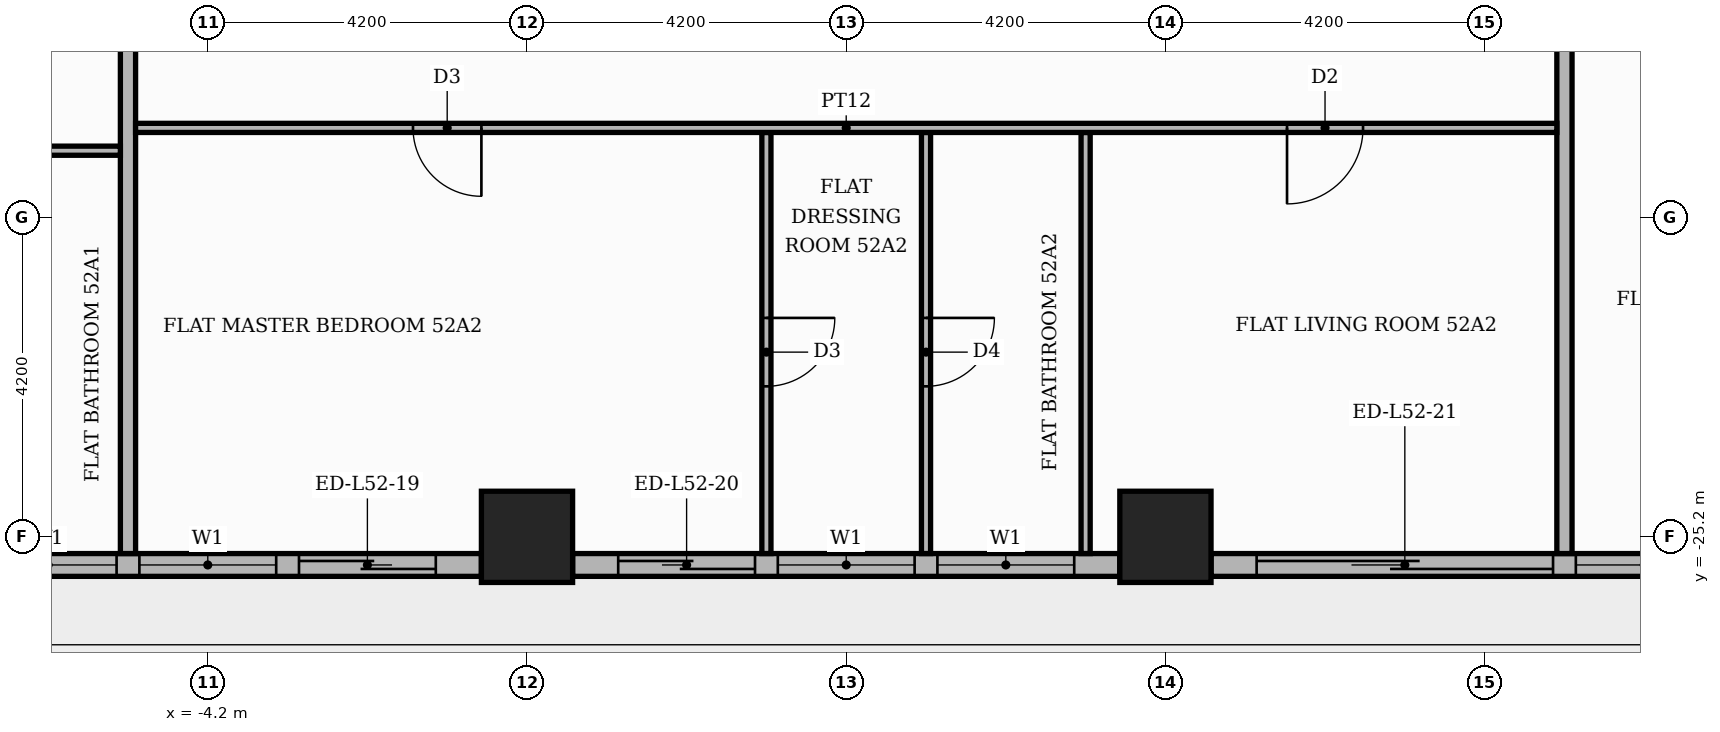
"""IFC4 building model, lengths in metres.
Left out: names, types, materials, properties, quantities, classifications, styles, units other than length and angle.
Written with IfcOpenShell. Run it as: python <this file> out.ifc"""

import sys

from ifc_helpers import new_model, si_unit, direction, frame, frame_2d, origin, origin_2d, place, context, subcontext, project, spatial, rectangle, extrude, element, fill, save


model = new_model("IFC4")
c1 = context("Model", 3, precision=1e-05, world=origin(), true_north=direction((0.0, 1.0)))
c2 = subcontext(c1, "Body", "Model", "MODEL_VIEW")
j1 = project(units=[si_unit("LENGTHUNIT", "METRE"), si_unit("PLANEANGLEUNIT", "RADIAN")], contexts=[c1])
p1 = place(None, origin())
s1 = spatial("IfcSite", under=j1, at=p1, CompositionType="ELEMENT")
p2 = place(p1, origin())
s2 = spatial("IfcBuilding", under=s1, at=p2, CompositionType="ELEMENT")
p3 = place(p2, frame((0.0, 0.0, 219.6)))
s3 = spatial("IfcBuildingStorey", under=s2, at=p3, CompositionType="ELEMENT", Elevation=219.6)
for number, where, z_axis, x_axis in (
    (1, (0.0, -25.2, 0.0), (0.0, 0.0, 1.0), (1.0, 0.0, 0.0)),
    (2, (8.4, -25.2, 0.0), (0.0, 0.0, 1.0), (1.0, 0.0, 0.0)),
):
    element("IfcColumn", number, at=place(p3, frame(where, z_axis=z_axis, x_axis=x_axis)), inside=s3, PredefinedType="COLUMN", context=c2, shape_type="SweptSolid", body=[
        extrude(rectangle(XDim=1.2, YDim=1.2, at=origin_2d()), origin(), (0.0, 0.0, 1.0), 3.9),
    ])
p4 = place(p3, frame((-7.8, -25.57, 0.0), z_axis=(0.0, 0.0, 1.0), x_axis=(1.0, 0.0, 0.0)))
e3 = element("IfcWall", 3, at=p4, inside=s3, PredefinedType="STANDARD", context=c2, shape_type="SweptSolid", body=[
    extrude(rectangle(XDim=7.2, YDim=0.3, at=frame_2d((3.6, 0.0))), origin(), (0.0, 0.0, 1.0), 3.48),
])
p5 = place(p4, frame((0.6, 0.0, 0.9)))
e4 = element("IfcOpeningElement", 4, at=p5, cuts=e3, PredefinedType="OPENING", context=c2, shape_type="SweptSolid", body=[
    extrude(rectangle(XDim=1.8, YDim=2.1, at=frame_2d((0.9, 1.05))), frame((0.0, 0.16, 0.0), z_axis=(0.0, -1.0, 0.0), x_axis=(1.0, 0.0, 0.0)), (0.0, 0.0, 1.0), 0.32),
])
p6 = place(p4, frame((2.7, 0.0, 0.9)))
e5 = element("IfcOpeningElement", 5, at=p6, cuts=e3, PredefinedType="OPENING", context=c2, shape_type="SweptSolid", body=[
    extrude(rectangle(XDim=1.8, YDim=2.1, at=frame_2d((0.9, 1.05))), frame((0.0, 0.16, 0.0), z_axis=(0.0, -1.0, 0.0), x_axis=(1.0, 0.0, 0.0)), (0.0, 0.0, 1.0), 0.32),
])
p7 = place(p4, frame((4.8, 0.0, 0.0)))
e6 = element("IfcOpeningElement", 6, at=p7, cuts=e3, PredefinedType="OPENING", context=c2, shape_type="SweptSolid", body=[
    extrude(rectangle(XDim=1.8, YDim=2.4, at=frame_2d((0.9, 1.2))), frame((0.0, 0.16, 0.0), z_axis=(0.0, -1.0, 0.0), x_axis=(1.0, 0.0, 0.0)), (0.0, 0.0, 1.0), 0.32),
])
p8 = place(p3, frame((0.6, -25.57, 0.0), z_axis=(0.0, 0.0, 1.0), x_axis=(1.0, 0.0, 0.0)))
e7 = element("IfcWall", 7, at=p8, inside=s3, PredefinedType="STANDARD", context=c2, shape_type="SweptSolid", body=[
    extrude(rectangle(XDim=7.2, YDim=0.3, at=frame_2d((3.6, 0.0))), origin(), (0.0, 0.0, 1.0), 3.48),
])
p9 = place(p8, frame((0.6, 0.0, 0.0)))
e8 = element("IfcOpeningElement", 8, at=p9, cuts=e7, PredefinedType="OPENING", context=c2, shape_type="SweptSolid", body=[
    extrude(rectangle(XDim=1.8, YDim=2.4, at=frame_2d((0.9, 1.2))), frame((0.0, 0.16, 0.0), z_axis=(0.0, -1.0, 0.0), x_axis=(1.0, 0.0, 0.0)), (0.0, 0.0, 1.0), 0.32),
])
p10 = place(p8, frame((2.7, 0.0, 0.9)))
e9 = element("IfcOpeningElement", 9, at=p10, cuts=e7, PredefinedType="OPENING", context=c2, shape_type="SweptSolid", body=[
    extrude(rectangle(XDim=1.8, YDim=2.1, at=frame_2d((0.9, 1.05))), frame((0.0, 0.16, 0.0), z_axis=(0.0, -1.0, 0.0), x_axis=(1.0, 0.0, 0.0)), (0.0, 0.0, 1.0), 0.32),
])
p11 = place(p8, frame((4.8, 0.0, 0.9)))
e10 = element("IfcOpeningElement", 10, at=p11, cuts=e7, PredefinedType="OPENING", context=c2, shape_type="SweptSolid", body=[
    extrude(rectangle(XDim=1.8, YDim=2.1, at=frame_2d((0.9, 1.05))), frame((0.0, 0.16, 0.0), z_axis=(0.0, -1.0, 0.0), x_axis=(1.0, 0.0, 0.0)), (0.0, 0.0, 1.0), 0.32),
])
p12 = place(p3, frame((9.0, -25.57, 0.0), z_axis=(0.0, 0.0, 1.0), x_axis=(1.0, 0.0, 0.0)))
e11 = element("IfcWall", 11, at=p12, inside=s3, PredefinedType="STANDARD", context=c2, shape_type="SweptSolid", body=[
    extrude(rectangle(XDim=7.2, YDim=0.3, at=frame_2d((3.6, 0.0))), origin(), (0.0, 0.0, 1.0), 3.48),
])
p13 = place(p12, frame((0.6, 0.0, 0.0)))
e12 = element("IfcOpeningElement", 12, at=p13, cuts=e11, PredefinedType="OPENING", context=c2, shape_type="SweptSolid", body=[
    extrude(rectangle(XDim=3.9, YDim=2.4, at=frame_2d((1.95, 1.2))), frame((0.0, 0.16, 0.0), z_axis=(0.0, -1.0, 0.0), x_axis=(1.0, 0.0, 0.0)), (0.0, 0.0, 1.0), 0.32),
])
p14 = place(p12, frame((4.8, 0.0, 0.9)))
e13 = element("IfcOpeningElement", 13, at=p14, cuts=e11, PredefinedType="OPENING", context=c2, shape_type="SweptSolid", body=[
    extrude(rectangle(XDim=1.8, YDim=2.1, at=frame_2d((0.9, 1.05))), frame((0.0, 0.16, 0.0), z_axis=(0.0, -1.0, 0.0), x_axis=(1.0, 0.0, 0.0)), (0.0, 0.0, 1.0), 0.32),
])
p15 = place(p3, frame((-5.25, -25.42, 0.0), z_axis=(0.0, 0.0, 1.0), x_axis=(0.0, 1.0, 0.0)))
e14 = element("IfcWall", 14, at=p15, inside=s3, PredefinedType="PARTITIONING", context=c2, shape_type="SweptSolid", body=[
    extrude(rectangle(XDim=11.67, YDim=0.2, at=frame_2d((5.835, 0.0))), origin(), (0.0, 0.0, 1.0), 3.48),
])
p16 = place(p3, frame((3.15, -25.42, 0.0), z_axis=(0.0, 0.0, 1.0), x_axis=(0.0, 1.0, 0.0)))
e15 = element("IfcWall", 15, at=p16, inside=s3, PredefinedType="PARTITIONING", context=c2, shape_type="SweptSolid", body=[
    extrude(rectangle(XDim=5.54, YDim=0.12, at=frame_2d((2.77, 0.0))), origin(), (0.0, 0.0, 1.0), 3.48),
])
p17 = place(p16, frame((2.2, 0.0, 0.0)))
e16 = element("IfcOpeningElement", 16, at=p17, cuts=e15, PredefinedType="OPENING", context=c2, shape_type="SweptSolid", body=[
    extrude(rectangle(XDim=0.9, YDim=2.1, at=frame_2d((0.45, 1.05))), frame((0.0, 0.07, 0.0), z_axis=(0.0, -1.0, 0.0), x_axis=(1.0, 0.0, 0.0)), (0.0, 0.0, 1.0), 0.14),
])
p18 = place(p3, frame((5.25, -25.42, 0.0), z_axis=(0.0, 0.0, 1.0), x_axis=(0.0, 1.0, 0.0)))
e17 = element("IfcWall", 17, at=p18, inside=s3, PredefinedType="PARTITIONING", context=c2, shape_type="SweptSolid", body=[
    extrude(rectangle(XDim=5.54, YDim=0.12, at=frame_2d((2.77, 0.0))), origin(), (0.0, 0.0, 1.0), 3.48),
])
p19 = place(p18, frame((2.2, 0.0, 0.0)))
e18 = element("IfcOpeningElement", 18, at=p19, cuts=e17, PredefinedType="OPENING", context=c2, shape_type="SweptSolid", body=[
    extrude(rectangle(XDim=0.9, YDim=2.1, at=frame_2d((0.45, 1.05))), frame((0.0, 0.07, 0.0), z_axis=(0.0, -1.0, 0.0), x_axis=(1.0, 0.0, 0.0)), (0.0, 0.0, 1.0), 0.14),
])
p20 = place(p3, frame((7.35, -25.42, 0.0), z_axis=(0.0, 0.0, 1.0), x_axis=(0.0, 1.0, 0.0)))
e19 = element("IfcWall", 19, at=p20, inside=s3, PredefinedType="PARTITIONING", context=c2, shape_type="SweptSolid", body=[
    extrude(rectangle(XDim=5.54, YDim=0.12, at=frame_2d((2.77, 0.0))), origin(), (0.0, 0.0, 1.0), 3.48),
])
p21 = place(p3, frame((13.65, -25.42, 0.0), z_axis=(0.0, 0.0, 1.0), x_axis=(0.0, 1.0, 0.0)))
e20 = element("IfcWall", 20, at=p21, inside=s3, PredefinedType="PARTITIONING", context=c2, shape_type="SweptSolid", body=[
    extrude(rectangle(XDim=11.67, YDim=0.2, at=frame_2d((5.835, 0.0))), origin(), (0.0, 0.0, 1.0), 3.48),
])
p22 = place(p3, frame((-25.42, -20.12, 0.0), z_axis=(0.0, 0.0, 1.0), x_axis=(1.0, 0.0, 0.0)))
e21 = element("IfcWall", 21, at=p22, inside=s3, PredefinedType="PARTITIONING", context=c2, shape_type="SweptSolid", body=[
    extrude(rectangle(XDim=20.07, YDim=0.12, at=frame_2d((10.035, 0.0))), origin(), (0.0, 0.0, 1.0), 3.48),
])
p23 = place(p22, frame((10.22, 0.0, 0.0)))
e22 = element("IfcOpeningElement", 22, at=p23, cuts=e21, PredefinedType="OPENING", context=c2, shape_type="SweptSolid", body=[
    extrude(rectangle(XDim=1.0, YDim=2.1, at=frame_2d((0.5, 1.05))), frame((0.0, 0.07, 0.0), z_axis=(0.0, -1.0, 0.0), x_axis=(1.0, 0.0, 0.0)), (0.0, 0.0, 1.0), 0.14),
])
p24 = place(p22, frame((13.42, 0.0, 0.0)))
e23 = element("IfcOpeningElement", 23, at=p24, cuts=e21, PredefinedType="OPENING", context=c2, shape_type="SweptSolid", body=[
    extrude(rectangle(XDim=0.9, YDim=2.1, at=frame_2d((0.45, 1.05))), frame((0.0, 0.07, 0.0), z_axis=(0.0, -1.0, 0.0), x_axis=(1.0, 0.0, 0.0)), (0.0, 0.0, 1.0), 0.14),
])
p25 = place(p3, frame((-5.15, -19.82, 0.0), z_axis=(0.0, 0.0, 1.0), x_axis=(1.0, 0.0, 0.0)))
e24 = element("IfcWall", 24, at=p25, inside=s3, PredefinedType="PARTITIONING", context=c2, shape_type="SweptSolid", body=[
    extrude(rectangle(XDim=18.7, YDim=0.12, at=frame_2d((9.35, 0.0))), origin(), (0.0, 0.0, 1.0), 3.48),
])
p26 = place(p25, frame((3.65, 0.0, 0.0)))
e25 = element("IfcOpeningElement", 25, at=p26, cuts=e24, PredefinedType="OPENING", context=c2, shape_type="SweptSolid", body=[
    extrude(rectangle(XDim=0.9, YDim=2.1, at=frame_2d((0.45, 1.05))), frame((0.0, 0.07, 0.0), z_axis=(0.0, -1.0, 0.0), x_axis=(1.0, 0.0, 0.0)), (0.0, 0.0, 1.0), 0.14),
])
p27 = place(p25, frame((15.15, 0.0, 0.0)))
e26 = element("IfcOpeningElement", 26, at=p27, cuts=e24, PredefinedType="OPENING", context=c2, shape_type="SweptSolid", body=[
    extrude(rectangle(XDim=1.0, YDim=2.1, at=frame_2d((0.5, 1.05))), frame((0.0, 0.07, 0.0), z_axis=(0.0, -1.0, 0.0), x_axis=(1.0, 0.0, 0.0)), (0.0, 0.0, 1.0), 0.14),
])
p28 = place(p5, origin())
e27 = element("IfcWindow", 27, at=p28, inside=s3, PartitioningType="SINGLE_PANEL", PredefinedType="WINDOW", context=c2, shape_type="SweptSolid", body=[
    extrude(rectangle(XDim=1.8, YDim=2.1, at=frame_2d((0.9, 1.05))), frame((0.0, 0.03, 0.0), z_axis=(0.0, -1.0, 0.0), x_axis=(1.0, 0.0, 0.0)), (0.0, 0.0, 1.0), 0.06),
])
fill(e4, e27)
p29 = place(p6, origin())
e28 = element("IfcWindow", 28, at=p29, inside=s3, PartitioningType="SINGLE_PANEL", PredefinedType="WINDOW", context=c2, shape_type="SweptSolid", body=[
    extrude(rectangle(XDim=1.8, YDim=2.1, at=frame_2d((0.9, 1.05))), frame((0.0, 0.03, 0.0), z_axis=(0.0, -1.0, 0.0), x_axis=(1.0, 0.0, 0.0)), (0.0, 0.0, 1.0), 0.06),
])
fill(e5, e28)
p30 = place(p7, origin())
e29 = element("IfcDoor", 29, at=p30, inside=s3, OperationType="SLIDING_TO_RIGHT", PredefinedType="DOOR", context=c2, shape_type="SweptSolid", body=[
    extrude(rectangle(XDim=1.8, YDim=2.4, at=frame_2d((0.9, 1.2))), frame((0.0, 0.025, 0.0), z_axis=(0.0, -1.0, 0.0), x_axis=(1.0, 0.0, 0.0)), (0.0, 0.0, 1.0), 0.05),
])
fill(e6, e29)
p31 = place(p9, origin())
e30 = element("IfcDoor", 30, at=p31, inside=s3, OperationType="SLIDING_TO_LEFT", PredefinedType="DOOR", context=c2, shape_type="SweptSolid", body=[
    extrude(rectangle(XDim=1.8, YDim=2.4, at=frame_2d((0.9, 1.2))), frame((0.0, 0.025, 0.0), z_axis=(0.0, -1.0, 0.0), x_axis=(1.0, 0.0, 0.0)), (0.0, 0.0, 1.0), 0.05),
])
fill(e8, e30)
p32 = place(p10, origin())
e31 = element("IfcWindow", 31, at=p32, inside=s3, PartitioningType="SINGLE_PANEL", PredefinedType="WINDOW", context=c2, shape_type="SweptSolid", body=[
    extrude(rectangle(XDim=1.8, YDim=2.1, at=frame_2d((0.9, 1.05))), frame((0.0, 0.03, 0.0), z_axis=(0.0, -1.0, 0.0), x_axis=(1.0, 0.0, 0.0)), (0.0, 0.0, 1.0), 0.06),
])
fill(e9, e31)
p33 = place(p11, origin())
e32 = element("IfcWindow", 32, at=p33, inside=s3, PartitioningType="SINGLE_PANEL", PredefinedType="WINDOW", context=c2, shape_type="SweptSolid", body=[
    extrude(rectangle(XDim=1.8, YDim=2.1, at=frame_2d((0.9, 1.05))), frame((0.0, 0.03, 0.0), z_axis=(0.0, -1.0, 0.0), x_axis=(1.0, 0.0, 0.0)), (0.0, 0.0, 1.0), 0.06),
])
fill(e10, e32)
p34 = place(p13, origin())
e33 = element("IfcDoor", 33, at=p34, inside=s3, OperationType="SLIDING_TO_LEFT", PredefinedType="DOOR", context=c2, shape_type="SweptSolid", body=[
    extrude(rectangle(XDim=3.9, YDim=2.4, at=frame_2d((1.95, 1.2))), frame((0.0, 0.025, 0.0), z_axis=(0.0, -1.0, 0.0), x_axis=(1.0, 0.0, 0.0)), (0.0, 0.0, 1.0), 0.05),
])
fill(e12, e33)
p35 = place(p14, origin())
e34 = element("IfcWindow", 34, at=p35, inside=s3, PartitioningType="SINGLE_PANEL", PredefinedType="WINDOW", context=c2, shape_type="SweptSolid", body=[
    extrude(rectangle(XDim=1.8, YDim=2.1, at=frame_2d((0.9, 1.05))), frame((0.0, 0.03, 0.0), z_axis=(0.0, -1.0, 0.0), x_axis=(1.0, 0.0, 0.0)), (0.0, 0.0, 1.0), 0.06),
])
fill(e13, e34)
p36 = place(p26, frame((0.9, 0.0, 0.0), z_axis=(0.0, 0.0, 1.0), x_axis=(-1.0, 0.0, 0.0)))
e35 = element("IfcDoor", 35, at=p36, inside=s3, OperationType="SINGLE_SWING_RIGHT", PredefinedType="DOOR", context=c2, shape_type="SweptSolid", body=[
    extrude(rectangle(XDim=0.9, YDim=2.1, at=frame_2d((0.45, 1.05))), frame((0.0, 0.025, 0.0), z_axis=(0.0, -1.0, 0.0), x_axis=(1.0, 0.0, 0.0)), (0.0, 0.0, 1.0), 0.05),
])
fill(e25, e35)
p37 = place(p17, frame((0.9, 0.0, 0.0), z_axis=(0.0, 0.0, 1.0), x_axis=(-1.0, 0.0, 0.0)))
e36 = element("IfcDoor", 36, at=p37, inside=s3, OperationType="SINGLE_SWING_RIGHT", PredefinedType="DOOR", context=c2, shape_type="SweptSolid", body=[
    extrude(rectangle(XDim=0.9, YDim=2.1, at=frame_2d((0.45, 1.05))), frame((0.0, 0.025, 0.0), z_axis=(0.0, -1.0, 0.0), x_axis=(1.0, 0.0, 0.0)), (0.0, 0.0, 1.0), 0.05),
])
fill(e16, e36)
p38 = place(p19, frame((0.9, 0.0, 0.0), z_axis=(0.0, 0.0, 1.0), x_axis=(-1.0, 0.0, 0.0)))
e37 = element("IfcDoor", 37, at=p38, inside=s3, OperationType="SINGLE_SWING_RIGHT", PredefinedType="DOOR", context=c2, shape_type="SweptSolid", body=[
    extrude(rectangle(XDim=0.9, YDim=2.1, at=frame_2d((0.45, 1.05))), frame((0.0, 0.025, 0.0), z_axis=(0.0, -1.0, 0.0), x_axis=(1.0, 0.0, 0.0)), (0.0, 0.0, 1.0), 0.05),
])
fill(e18, e37)
p39 = place(p27, frame((1.0, 0.0, 0.0), z_axis=(0.0, 0.0, 1.0), x_axis=(-1.0, 0.0, 0.0)))
e38 = element("IfcDoor", 38, at=p39, inside=s3, OperationType="SINGLE_SWING_LEFT", PredefinedType="DOOR", context=c2, shape_type="SweptSolid", body=[
    extrude(rectangle(XDim=1.0, YDim=2.1, at=frame_2d((0.5, 1.05))), frame((0.0, 0.025, 0.0), z_axis=(0.0, -1.0, 0.0), x_axis=(1.0, 0.0, 0.0)), (0.0, 0.0, 1.0), 0.05),
])
fill(e26, e38)
save(model, sys.argv[1])
